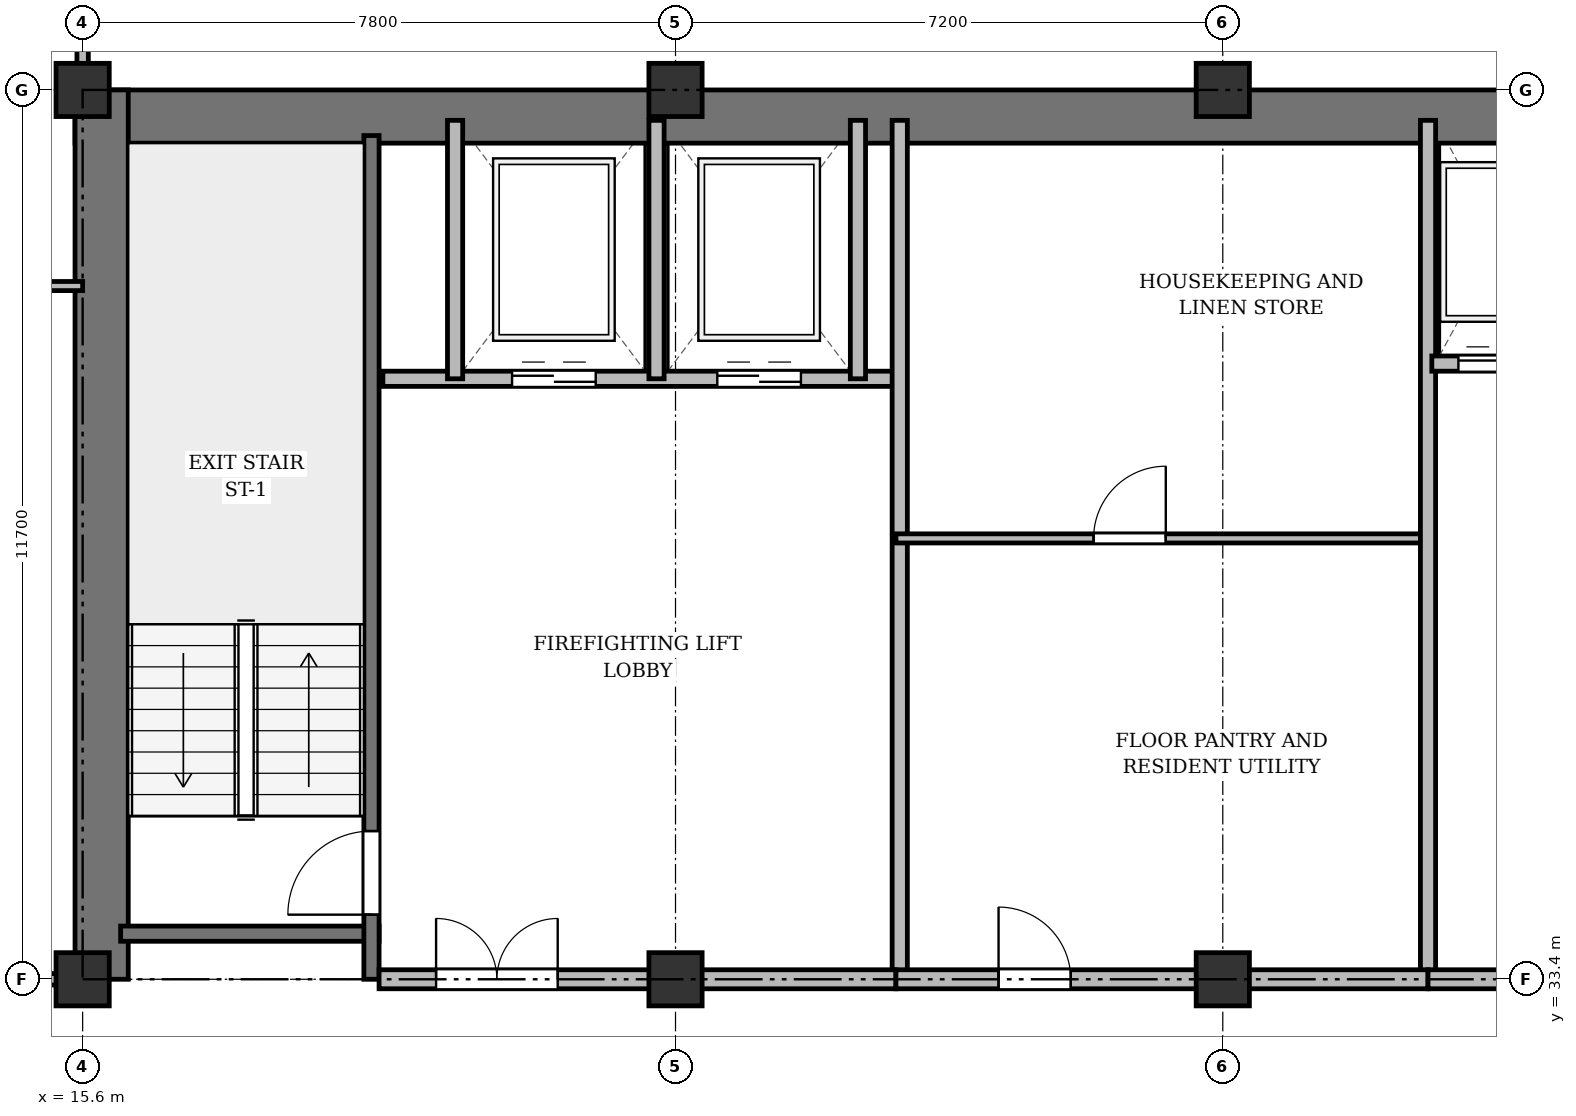
"""IFC4 building model, lengths in metres.
Left out: names, types, materials, properties, quantities, classifications, styles, units other than length and angle.
Written with IfcOpenShell. Run it as: python <this file> out.ifc"""

import sys

from ifc_helpers import new_model, si_unit, direction, frame, frame_2d, origin, origin_2d, place, context, subcontext, project, spatial, rectangle, extrude, source, transform, mapped, element, fill, save


model = new_model("IFC4")
c1 = context("Model", 3, precision=1e-05, world=origin(), true_north=direction((0.0, 1.0)))
c2 = subcontext(c1, "Body", "Model", "MODEL_VIEW")
j1 = project(units=[si_unit("LENGTHUNIT", "METRE"), si_unit("PLANEANGLEUNIT", "RADIAN")], contexts=[c1])
p1 = place(None, origin())
s1 = spatial("IfcSite", under=j1, at=p1, CompositionType="ELEMENT")
p2 = place(p1, origin())
s2 = spatial("IfcBuilding", under=s1, at=p2, CompositionType="ELEMENT")
p3 = place(p2, frame((0.0, 0.0, 139.3)))
s3 = spatial("IfcBuildingStorey", under=s2, at=p3, CompositionType="ELEMENT", Elevation=139.3)
m1 = source(origin(), c2, "Body", "SweptSolid", [
    extrude(rectangle(XDim=0.7, YDim=0.7, at=origin_2d()), origin(), (0.0, 0.0, 1.0), 3.6),
])
for number, where, z_axis, x_axis in (
    (1, (15.6, 33.4, 0.0), (0.0, 0.0, 1.0), (1.0, 0.0, 0.0)),
    (2, (15.6, 45.1, 0.0), (0.0, 0.0, 1.0), (1.0, 0.0, 0.0)),
    (3, (23.4, 33.4, 0.0), (0.0, 0.0, 1.0), (1.0, 0.0, 0.0)),
    (4, (23.4, 45.1, 0.0), (0.0, 0.0, 1.0), (1.0, 0.0, 0.0)),
    (5, (30.6, 33.4, 0.0), (0.0, 0.0, 1.0), (1.0, 0.0, 0.0)),
    (6, (30.6, 45.1, 0.0), (0.0, 0.0, 1.0), (1.0, 0.0, 0.0)),
):
    element("IfcColumn", number, at=place(p3, frame(where, z_axis=z_axis, x_axis=x_axis)), inside=s3, PredefinedType="COLUMN", context=c2, shape_type="MappedRepresentation", body=[
        mapped(m1, transform((0.0, 0.0, 0.0), x_axis=(1.0, 0.0, 0.0), y_axis=(0.0, 1.0, 0.0), z_axis=(0.0, 0.0, 1.0), scale=1.0)),
    ])
p4 = place(p3, frame((15.5, 44.75, 0.0), z_axis=(0.0, 0.0, 1.0), x_axis=(1.0, 0.0, 0.0)))
e7 = element("IfcWall", 7, at=p4, inside=s3, PredefinedType="SHEAR", context=c2, shape_type="SweptSolid", body=[
    extrude(rectangle(XDim=43.4, YDim=0.7, at=frame_2d((21.7, 0.0))), origin(), (0.0, 0.0, 1.0), 3.35),
])
p5 = place(p3, frame((15.85, 33.4, 0.0), z_axis=(0.0, 0.0, 1.0), x_axis=(0.0, 1.0, 0.0)))
e8 = element("IfcWall", 8, at=p5, inside=s3, PredefinedType="SHEAR", context=c2, shape_type="SweptSolid", body=[
    extrude(rectangle(XDim=11.7, YDim=0.7, at=frame_2d((5.85, 0.0))), origin(), (0.0, 0.0, 1.0), 3.35),
])
p6 = place(p3, frame((16.1, 34.0, 0.0), z_axis=(0.0, 0.0, 1.0), x_axis=(1.0, 0.0, 0.0)))
e9 = element("IfcWall", 9, at=p6, inside=s3, PredefinedType="SHEAR", context=c2, shape_type="SweptSolid", body=[
    extrude(rectangle(XDim=3.4, YDim=0.2, at=frame_2d((1.7, 0.0))), origin(), (0.0, 0.0, 1.0), 3.35),
])
p7 = place(p3, frame((19.4, 33.4, 0.0), z_axis=(0.0, 0.0, 1.0), x_axis=(0.0, 1.0, 0.0)))
e10 = element("IfcWall", 10, at=p7, inside=s3, PredefinedType="SHEAR", context=c2, shape_type="SweptSolid", body=[
    extrude(rectangle(XDim=11.1, YDim=0.2, at=frame_2d((5.55, 0.0))), origin(), (0.0, 0.0, 1.0), 3.35),
])
p8 = place(p7, frame((0.85, 0.0, 0.0)))
e11 = element("IfcOpeningElement", 11, at=p8, cuts=e10, PredefinedType="OPENING", context=c2, shape_type="SweptSolid", body=[
    extrude(rectangle(XDim=1.1, YDim=2.15, at=frame_2d((0.55, 1.075))), frame((0.0, 0.11, 0.0), z_axis=(0.0, -1.0, 0.0), x_axis=(1.0, 0.0, 0.0)), (0.0, 0.0, 1.0), 0.22),
])
p9 = place(p3, frame((19.55, 41.3, 0.0), z_axis=(0.0, 0.0, 1.0), x_axis=(1.0, 0.0, 0.0)))
e12 = element("IfcWall", 12, at=p9, inside=s3, PredefinedType="SOLIDWALL", context=c2, shape_type="SweptSolid", body=[
    extrude(rectangle(XDim=6.75, YDim=0.2, at=frame_2d((3.375, 0.0))), origin(), (0.0, 0.0, 1.0), 3.35),
])
p10 = place(p9, frame((1.7, 0.0, 0.0)))
e13 = element("IfcOpeningElement", 13, at=p10, cuts=e12, PredefinedType="OPENING", context=c2, shape_type="SweptSolid", body=[
    extrude(rectangle(XDim=1.1, YDim=2.15, at=frame_2d((0.55, 1.075))), frame((0.0, 0.11, 0.0), z_axis=(0.0, -1.0, 0.0), x_axis=(1.0, 0.0, 0.0)), (0.0, 0.0, 1.0), 0.22),
])
p11 = place(p9, frame((4.4, 0.0, 0.0)))
e14 = element("IfcOpeningElement", 14, at=p11, cuts=e12, PredefinedType="OPENING", context=c2, shape_type="SweptSolid", body=[
    extrude(rectangle(XDim=1.1, YDim=2.15, at=frame_2d((0.55, 1.075))), frame((0.0, 0.11, 0.0), z_axis=(0.0, -1.0, 0.0), x_axis=(1.0, 0.0, 0.0)), (0.0, 0.0, 1.0), 0.22),
])
for number, where, z_axis, x_axis in (
    (15, (20.5, 41.3, 0.0), (0.0, 0.0, 1.0), (0.0, 1.0, 0.0)),
    (16, (23.15, 41.3, 0.0), (0.0, 0.0, 1.0), (0.0, 1.0, 0.0)),
    (17, (25.8, 41.3, 0.0), (0.0, 0.0, 1.0), (0.0, 1.0, 0.0)),
):
    element("IfcWall", number, at=place(p3, frame(where, z_axis=z_axis, x_axis=x_axis)), inside=s3, PredefinedType="SOLIDWALL", context=c2, shape_type="SweptSolid", body=[
        extrude(rectangle(XDim=3.4, YDim=0.2, at=frame_2d((1.7, 0.0))), origin(), (0.0, 0.0, 1.0), 3.35),
    ])
p12 = place(p3, frame((26.35, 33.4, 0.0), z_axis=(0.0, 0.0, 1.0), x_axis=(0.0, 1.0, 0.0)))
e18 = element("IfcWall", 18, at=p12, inside=s3, PredefinedType="SOLIDWALL", context=c2, shape_type="SweptSolid", body=[
    extrude(rectangle(XDim=11.3, YDim=0.2, at=frame_2d((5.65, 0.0))), origin(), (0.0, 0.0, 1.0), 2.75),
])
p13 = place(p3, frame((19.5, 33.4, 0.0), z_axis=(0.0, 0.0, 1.0), x_axis=(1.0, 0.0, 0.0)))
e19 = element("IfcWall", 19, at=p13, inside=s3, PredefinedType="PARTITIONING", context=c2, shape_type="SweptSolid", body=[
    extrude(rectangle(XDim=6.8, YDim=0.25, at=frame_2d((3.4, 0.0))), origin(), (0.0, 0.0, 1.0), 2.75),
])
p14 = place(p13, frame((0.75, 0.0, 0.0)))
e20 = element("IfcOpeningElement", 20, at=p14, cuts=e19, PredefinedType="OPENING", context=c2, shape_type="SweptSolid", body=[
    extrude(rectangle(XDim=1.6, YDim=2.2, at=frame_2d((0.8, 1.1))), frame((0.0, 0.135, 0.0), z_axis=(0.0, -1.0, 0.0), x_axis=(1.0, 0.0, 0.0)), (0.0, 0.0, 1.0), 0.27),
])
p15 = place(p3, frame((26.3, 39.2, 0.0), z_axis=(0.0, 0.0, 1.0), x_axis=(1.0, 0.0, 0.0)))
e21 = element("IfcWall", 21, at=p15, inside=s3, PredefinedType="PARTITIONING", context=c2, shape_type="SweptSolid", body=[
    extrude(rectangle(XDim=7.0, YDim=0.12, at=frame_2d((3.5, 0.0))), origin(), (0.0, 0.0, 1.0), 2.85),
])
p16 = place(p15, frame((2.6, 0.0, 0.0)))
e22 = element("IfcOpeningElement", 22, at=p16, cuts=e21, PredefinedType="OPENING", context=c2, shape_type="SweptSolid", body=[
    extrude(rectangle(XDim=0.95, YDim=2.15, at=frame_2d((0.475, 1.075))), frame((0.0, 0.07, 0.0), z_axis=(0.0, -1.0, 0.0), x_axis=(1.0, 0.0, 0.0)), (0.0, 0.0, 1.0), 0.14),
])
p17 = place(p3, frame((33.3, 33.4, 0.0), z_axis=(0.0, 0.0, 1.0), x_axis=(0.0, 1.0, 0.0)))
e23 = element("IfcWall", 23, at=p17, inside=s3, PredefinedType="SOLIDWALL", context=c2, shape_type="SweptSolid", body=[
    extrude(rectangle(XDim=11.3, YDim=0.2, at=frame_2d((5.65, 0.0))), origin(), (0.0, 0.0, 1.0), 2.75),
])
p18 = place(p3, frame((33.35, 41.5, 0.0), z_axis=(0.0, 0.0, 1.0), x_axis=(1.0, 0.0, 0.0)))
e24 = element("IfcWall", 24, at=p18, inside=s3, PredefinedType="SOLIDWALL", context=c2, shape_type="SweptSolid", body=[
    extrude(rectangle(XDim=6.9, YDim=0.2, at=frame_2d((3.45, 0.0))), origin(), (0.0, 0.0, 1.0), 3.35),
])
p19 = place(p18, frame((0.35, 0.0, 0.0)))
e25 = element("IfcOpeningElement", 25, at=p19, cuts=e24, PredefinedType="OPENING", context=c2, shape_type="SweptSolid", body=[
    extrude(rectangle(XDim=1.05, YDim=2.15, at=frame_2d((0.525, 1.075))), frame((0.0, 0.11, 0.0), z_axis=(0.0, -1.0, 0.0), x_axis=(1.0, 0.0, 0.0)), (0.0, 0.0, 1.0), 0.22),
])
p20 = place(p18, frame((2.05, 0.0, 0.0)))
e26 = element("IfcOpeningElement", 26, at=p20, cuts=e24, PredefinedType="OPENING", context=c2, shape_type="SweptSolid", body=[
    extrude(rectangle(XDim=1.05, YDim=2.15, at=frame_2d((0.525, 1.075))), frame((0.0, 0.11, 0.0), z_axis=(0.0, -1.0, 0.0), x_axis=(1.0, 0.0, 0.0)), (0.0, 0.0, 1.0), 0.22),
])
p21 = place(p18, frame((3.75, 0.0, 0.0)))
e27 = element("IfcOpeningElement", 27, at=p21, cuts=e24, PredefinedType="OPENING", context=c2, shape_type="SweptSolid", body=[
    extrude(rectangle(XDim=1.05, YDim=2.15, at=frame_2d((0.525, 1.075))), frame((0.0, 0.11, 0.0), z_axis=(0.0, -1.0, 0.0), x_axis=(1.0, 0.0, 0.0)), (0.0, 0.0, 1.0), 0.22),
])
p22 = place(p18, frame((5.45, 0.0, 0.0)))
e28 = element("IfcOpeningElement", 28, at=p22, cuts=e24, PredefinedType="OPENING", context=c2, shape_type="SweptSolid", body=[
    extrude(rectangle(XDim=1.05, YDim=2.15, at=frame_2d((0.525, 1.075))), frame((0.0, 0.11, 0.0), z_axis=(0.0, -1.0, 0.0), x_axis=(1.0, 0.0, 0.0)), (0.0, 0.0, 1.0), 0.22),
])
p23 = place(p3, frame((26.3, 33.4, 0.0), z_axis=(0.0, 0.0, 1.0), x_axis=(1.0, 0.0, 0.0)))
e29 = element("IfcWall", 29, at=p23, inside=s3, PredefinedType="PARTITIONING", context=c2, shape_type="SweptSolid", body=[
    extrude(rectangle(XDim=7.0, YDim=0.25, at=frame_2d((3.5, 0.0))), origin(), (0.0, 0.0, 1.0), 2.75),
])
p24 = place(p23, frame((1.35, 0.0, 0.0)))
e30 = element("IfcOpeningElement", 30, at=p24, cuts=e29, PredefinedType="OPENING", context=c2, shape_type="SweptSolid", body=[
    extrude(rectangle(XDim=0.95, YDim=2.15, at=frame_2d((0.475, 1.075))), frame((0.0, 0.135, 0.0), z_axis=(0.0, -1.0, 0.0), x_axis=(1.0, 0.0, 0.0)), (0.0, 0.0, 1.0), 0.27),
])
p25 = place(p3, frame((33.3, 33.4, 0.0), z_axis=(0.0, 0.0, 1.0), x_axis=(1.0, 0.0, 0.0)))
e31 = element("IfcWall", 31, at=p25, inside=s3, PredefinedType="PARTITIONING", context=c2, shape_type="SweptSolid", body=[
    extrude(rectangle(XDim=13.85, YDim=0.25, at=frame_2d((6.925, 0.0))), origin(), (0.0, 0.0, 1.0), 2.75),
])
p26 = place(p25, frame((4.2, 0.0, 0.0)))
e32 = element("IfcOpeningElement", 32, at=p26, cuts=e31, PredefinedType="OPENING", context=c2, shape_type="SweptSolid", body=[
    extrude(rectangle(XDim=1.6, YDim=2.2, at=frame_2d((0.8, 1.1))), frame((0.0, 0.135, 0.0), z_axis=(0.0, -1.0, 0.0), x_axis=(1.0, 0.0, 0.0)), (0.0, 0.0, 1.0), 0.27),
])
p27 = place(p3, frame((11.825, 42.52, 0.0), z_axis=(0.0, 0.0, 1.0), x_axis=(1.0, 0.0, 0.0)))
e33 = element("IfcWall", 33, at=p27, inside=s3, PredefinedType="PARTITIONING", context=c2, shape_type="SweptSolid", body=[
    extrude(rectangle(XDim=3.775, YDim=0.12, at=frame_2d((1.888, 0.0))), origin(), (0.0, 0.0, 1.0), 2.85),
])
p28 = place(p27, frame((1.319, 0.0, 0.0)))
e34 = element("IfcOpeningElement", 34, at=p28, cuts=e33, PredefinedType="OPENING", context=c2, shape_type="SweptSolid", body=[
    extrude(rectangle(XDim=0.95, YDim=2.15, at=frame_2d((0.475, 1.075))), frame((0.0, 0.07, 0.0), z_axis=(0.0, -1.0, 0.0), x_axis=(1.0, 0.0, 0.0)), (0.0, 0.0, 1.0), 0.14),
])
p29 = place(p3, frame((8.05, 33.4, 0.0), z_axis=(0.0, 0.0, 1.0), x_axis=(1.0, 0.0, 0.0)))
e35 = element("IfcWall", 35, at=p29, inside=s3, PredefinedType="PARTITIONING", context=c2, shape_type="SweptSolid", body=[
    extrude(rectangle(XDim=7.55, YDim=0.15, at=frame_2d((3.775, 0.0))), origin(), (0.0, 0.0, 1.0), 2.75),
])
p30 = place(p29, frame((4.375, 0.0, 0.0)))
e36 = element("IfcOpeningElement", 36, at=p30, cuts=e35, PredefinedType="OPENING", context=c2, shape_type="SweptSolid", body=[
    extrude(rectangle(XDim=0.95, YDim=2.15, at=frame_2d((0.475, 1.075))), frame((0.0, 0.085, 0.0), z_axis=(0.0, -1.0, 0.0), x_axis=(1.0, 0.0, 0.0)), (0.0, 0.0, 1.0), 0.17),
])
p31 = place(p3, frame((15.6, 44.75, 0.0), z_axis=(0.0, 0.0, 1.0), x_axis=(0.0, 1.0, 0.0)))
e37 = element("IfcWall", 37, at=p31, inside=s3, PredefinedType="PARTITIONING", context=c2, shape_type="SweptSolid", body=[
    extrude(rectangle(XDim=3.61, YDim=0.15, at=frame_2d((1.805, 0.0))), origin(), (0.0, 0.0, 1.0), 2.85),
])
p32 = place(p31, frame((1.1, 0.0, 0.0)))
e38 = element("IfcOpeningElement", 38, at=p32, cuts=e37, PredefinedType="OPENING", context=c2, shape_type="SweptSolid", body=[
    extrude(rectangle(XDim=0.95, YDim=2.15, at=frame_2d((0.475, 1.075))), frame((0.0, 0.085, 0.0), z_axis=(0.0, -1.0, 0.0), x_axis=(1.0, 0.0, 0.0)), (0.0, 0.0, 1.0), 0.17),
])
m2 = source(origin(), c2, "Body", "SweptSolid", [
    extrude(rectangle(XDim=1.1, YDim=2.15, at=frame_2d((0.55, 1.075))), frame((0.0, 0.025, 0.0), z_axis=(0.0, -1.0, 0.0), x_axis=(1.0, 0.0, 0.0)), (0.0, 0.0, 1.0), 0.05),
])
p33 = place(p8, origin())
e39 = element("IfcDoor", 39, at=p33, inside=s3, OperationType="SINGLE_SWING_LEFT", PredefinedType="DOOR", context=c2, shape_type="MappedRepresentation", body=[
    mapped(m2, transform((0.0, 0.0, 0.0), x_axis=(1.0, 0.0, 0.0), y_axis=(0.0, 1.0, 0.0), z_axis=(0.0, 0.0, 1.0), scale=1.0)),
])
fill(e11, e39)
p34 = place(p10, origin())
e40 = element("IfcDoor", 40, at=p34, inside=s3, OperationType="DOUBLE_DOOR_SLIDING", PredefinedType="DOOR", context=c2, shape_type="MappedRepresentation", body=[
    mapped(m2, transform((0.0, 0.0, 0.0), x_axis=(1.0, 0.0, 0.0), y_axis=(0.0, 1.0, 0.0), z_axis=(0.0, 0.0, 1.0), scale=1.0)),
])
fill(e13, e40)
p35 = place(p11, origin())
e41 = element("IfcDoor", 41, at=p35, inside=s3, OperationType="DOUBLE_DOOR_SLIDING", PredefinedType="DOOR", context=c2, shape_type="MappedRepresentation", body=[
    mapped(m2, transform((0.0, 0.0, 0.0), x_axis=(1.0, 0.0, 0.0), y_axis=(0.0, 1.0, 0.0), z_axis=(0.0, 0.0, 1.0), scale=1.0)),
])
fill(e14, e41)
m3 = source(origin(), c2, "Body", "SweptSolid", [
    extrude(rectangle(XDim=1.6, YDim=2.2, at=frame_2d((0.8, 1.1))), frame((0.0, 0.025, 0.0), z_axis=(0.0, -1.0, 0.0), x_axis=(1.0, 0.0, 0.0)), (0.0, 0.0, 1.0), 0.05),
])
p36 = place(p14, origin())
e42 = element("IfcDoor", 42, at=p36, inside=s3, OperationType="DOUBLE_DOOR_SINGLE_SWING", PredefinedType="DOOR", context=c2, shape_type="MappedRepresentation", body=[
    mapped(m3, transform((0.0, 0.0, 0.0), x_axis=(1.0, 0.0, 0.0), y_axis=(0.0, 1.0, 0.0), z_axis=(0.0, 0.0, 1.0), scale=1.0)),
])
fill(e20, e42)
m4 = source(origin(), c2, "Body", "SweptSolid", [
    extrude(rectangle(XDim=0.95, YDim=2.15, at=frame_2d((0.475, 1.075))), frame((0.0, 0.025, 0.0), z_axis=(0.0, -1.0, 0.0), x_axis=(1.0, 0.0, 0.0)), (0.0, 0.0, 1.0), 0.05),
])
p37 = place(p16, origin())
e43 = element("IfcDoor", 43, at=p37, inside=s3, OperationType="SINGLE_SWING_RIGHT", PredefinedType="DOOR", context=c2, shape_type="MappedRepresentation", body=[
    mapped(m4, transform((0.0, 0.0, 0.0), x_axis=(1.0, 0.0, 0.0), y_axis=(0.0, 1.0, 0.0), z_axis=(0.0, 0.0, 1.0), scale=1.0)),
])
fill(e22, e43)
m5 = source(origin(), c2, "Body", "SweptSolid", [
    extrude(rectangle(XDim=1.05, YDim=2.15, at=frame_2d((0.525, 1.075))), frame((0.0, 0.025, 0.0), z_axis=(0.0, -1.0, 0.0), x_axis=(1.0, 0.0, 0.0)), (0.0, 0.0, 1.0), 0.05),
])
p38 = place(p19, origin())
e44 = element("IfcDoor", 44, at=p38, inside=s3, OperationType="DOUBLE_DOOR_SLIDING", PredefinedType="DOOR", context=c2, shape_type="MappedRepresentation", body=[
    mapped(m5, transform((0.0, 0.0, 0.0), x_axis=(1.0, 0.0, 0.0), y_axis=(0.0, 1.0, 0.0), z_axis=(0.0, 0.0, 1.0), scale=1.0)),
])
fill(e25, e44)
p39 = place(p24, origin())
e45 = element("IfcDoor", 45, at=p39, inside=s3, OperationType="SINGLE_SWING_LEFT", PredefinedType="DOOR", context=c2, shape_type="MappedRepresentation", body=[
    mapped(m4, transform((0.0, 0.0, 0.0), x_axis=(1.0, 0.0, 0.0), y_axis=(0.0, 1.0, 0.0), z_axis=(0.0, 0.0, 1.0), scale=1.0)),
])
fill(e30, e45)
save(model, sys.argv[1])
